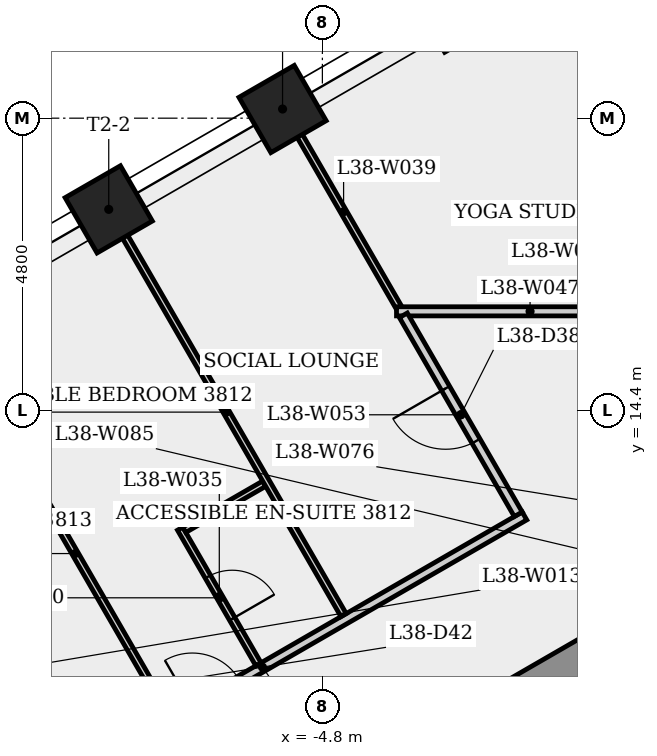
"""IFC4 building model, lengths in metres.
Left out: names, types, materials, properties, quantities, classifications, styles, units other than length and angle.
Written with IfcOpenShell. Run it as: python <this file> out.ifc"""

import sys

from ifc_helpers import new_model, si_unit, direction, frame, frame_2d, origin, origin_2d, place, context, subcontext, project, spatial, rectangle, extrude, element, fill, save


model = new_model("IFC4")
c1 = context("Model", 3, precision=1e-05, world=origin(), true_north=direction((0.0, 1.0)))
c2 = subcontext(c1, "Body", "Model", "MODEL_VIEW")
j1 = project(units=[si_unit("LENGTHUNIT", "METRE"), si_unit("PLANEANGLEUNIT", "RADIAN")], contexts=[c1])
p1 = place(None, origin())
s1 = spatial("IfcSite", under=j1, at=p1, CompositionType="ELEMENT")
p2 = place(p1, origin())
s2 = spatial("IfcBuilding", under=s1, at=p2, CompositionType="ELEMENT")
p3 = place(p2, frame((0.0, 0.0, 143.9)))
s3 = spatial("IfcBuildingStorey", under=s2, at=p3, CompositionType="ELEMENT", Elevation=143.9)
p4 = place(p3, frame((0.175, 10.667, 0.0), z_axis=(0.0, 0.0, 1.0), x_axis=(-0.866023993627, -0.500002442456, 0.0)))
e1 = element("IfcWall", 1, at=p4, inside=s3, PredefinedType="SHEAR", context=c2, shape_type="SweptSolid", body=[
    extrude(rectangle(XDim=10.97, YDim=0.7, at=frame_2d((5.485, 0.0))), origin(), (0.0, 0.0, 1.0), 4.0),
])
p5 = place(p4, frame((7.021, 0.0, 0.0)))
e2 = element("IfcOpeningElement", 2, at=p5, cuts=e1, PredefinedType="OPENING", context=c2, shape_type="SweptSolid", body=[
    extrude(rectangle(XDim=0.9, YDim=2.1, at=frame_2d((0.45, 1.05))), frame((0.0, 0.36, 0.0), z_axis=(0.0, -1.0, 0.0), x_axis=(1.0, 0.0, 0.0)), (0.0, 0.0, 1.0), 0.72),
])
for number, where, z_axis, x_axis in (
    (3, (-2.596, 21.001, 0.0), (0.0, 0.0, 1.0), (-0.5, 0.866, 0.0)),
    (4, (-5.455, 19.351, 0.0), (0.0, 0.0, 1.0), (-0.5, 0.866, 0.0)),
    (5, (-8.313, 17.7, 0.0), (0.0, 0.0, 1.0), (-0.5, 0.866, 0.0)),
):
    element("IfcColumn", number, at=place(p3, frame(where, z_axis=z_axis, x_axis=x_axis)), inside=s3, PredefinedType="COLUMN", context=c2, shape_type="SweptSolid", body=[
        extrude(rectangle(XDim=1.05, YDim=1.05, at=origin_2d()), origin(), (0.0, 0.0, 1.0), 4.0),
    ])
p6 = place(p3, frame((-10.094, 7.682, 0.0), z_axis=(0.0, 0.0, 1.0), x_axis=(0.866024204941, 0.500002076452, 0.0)))
e6 = element("IfcWall", 6, at=p6, inside=s3, PredefinedType="PARTITIONING", context=c2, shape_type="SweptSolid", body=[
    extrude(rectangle(XDim=9.951, YDim=0.15, at=frame_2d((4.976, 0.0))), origin(), (0.0, 0.0, 1.0), 3.6),
])
p7 = place(p6, frame((3.642, 0.0, 0.0)))
e7 = element("IfcOpeningElement", 7, at=p7, cuts=e6, PredefinedType="OPENING", context=c2, shape_type="SweptSolid", body=[
    extrude(rectangle(XDim=0.9, YDim=2.1, at=frame_2d((0.45, 1.05))), frame((0.0, 0.085, 0.0), z_axis=(0.0, -1.0, 0.0), x_axis=(1.0, 0.0, 0.0)), (0.0, 0.0, 1.0), 0.17),
])
p8 = place(p3, frame((-8.796, 8.518, 0.0), z_axis=(0.0, 0.0, 1.0), x_axis=(-0.500032699561, 0.866006523861, 0.0)))
e8 = element("IfcWall", 8, at=p8, inside=s3, PredefinedType="PARTITIONING", context=c2, shape_type="SweptSolid", body=[
    extrude(rectangle(XDim=2.475, YDim=0.1, at=frame_2d((1.237, 0.0))), origin(), (0.0, 0.0, 1.0), 3.6),
])
p9 = place(p8, frame((0.837, 0.0, 0.0)))
e9 = element("IfcOpeningElement", 9, at=p9, cuts=e8, PredefinedType="OPENING", context=c2, shape_type="SweptSolid", body=[
    extrude(rectangle(XDim=0.8, YDim=2.1, at=frame_2d((0.4, 1.05))), frame((0.0, 0.06, 0.0), z_axis=(0.0, -1.0, 0.0), x_axis=(1.0, 0.0, 0.0)), (0.0, 0.0, 1.0), 0.12),
])
p10 = place(p3, frame((-7.324, 9.368, 0.0), z_axis=(0.0, 0.0, 1.0), x_axis=(-0.500021201058, 0.866013163002, 0.0)))
e10 = element("IfcWall", 10, at=p10, inside=s3, PredefinedType="PARTITIONING", context=c2, shape_type="SweptSolid", body=[
    extrude(rectangle(XDim=7.711, YDim=0.1, at=frame_2d((3.855, 0.0))), origin(), (0.0, 0.0, 1.0), 3.6),
])
p11 = place(p3, frame((-7.139, 12.448, 0.0), z_axis=(0.0, 0.0, 1.0), x_axis=(0.500034319456, -0.866005588531, 0.0)))
e11 = element("IfcWall", 11, at=p11, inside=s3, PredefinedType="PARTITIONING", context=c2, shape_type="SweptSolid", body=[
    extrude(rectangle(XDim=2.575, YDim=0.1, at=frame_2d((1.288, 0.0))), origin(), (0.0, 0.0, 1.0), 3.6),
])
p12 = place(p11, frame((0.913, 0.0, 0.0)))
e12 = element("IfcOpeningElement", 12, at=p12, cuts=e11, PredefinedType="OPENING", context=c2, shape_type="SweptSolid", body=[
    extrude(rectangle(XDim=0.8, YDim=2.1, at=frame_2d((0.4, 1.05))), frame((0.0, 0.06, 0.0), z_axis=(0.0, -1.0, 0.0), x_axis=(1.0, 0.0, 0.0)), (0.0, 0.0, 1.0), 0.12),
])
p13 = place(p3, frame((-5.757, 13.188, 0.0), z_axis=(0.0, 0.0, 1.0), x_axis=(-0.866006015803, -0.500033579465, 0.0)))
e13 = element("IfcWall", 13, at=p13, inside=s3, PredefinedType="PARTITIONING", context=c2, shape_type="SweptSolid", body=[
    extrude(rectangle(XDim=1.517, YDim=0.1, at=frame_2d((0.759, 0.0))), origin(), (0.0, 0.0, 1.0), 3.6),
])
p14 = place(p3, frame((-5.359, 19.233, 0.0), z_axis=(0.0, 0.0, 1.0), x_axis=(0.499978511878, -0.866037809602, 0.0)))
e14 = element("IfcWall", 14, at=p14, inside=s3, PredefinedType="PARTITIONING", context=c2, shape_type="SweptSolid", body=[
    extrude(rectangle(XDim=3.632, YDim=0.1, at=frame_2d((1.816, 0.0))), origin(), (0.0, 0.0, 1.0), 3.6),
])
p15 = place(p3, frame((-4.451, 11.027, 0.0), z_axis=(0.0, 0.0, 1.0), x_axis=(-0.499983743644, 0.866034789193, 0.0)))
e15 = element("IfcWall", 15, at=p15, inside=s3, PredefinedType="PARTITIONING", context=c2, shape_type="SweptSolid", body=[
    extrude(rectangle(XDim=7.711, YDim=0.1, at=frame_2d((3.855, 0.0))), origin(), (0.0, 0.0, 1.0), 3.6),
])
p16 = place(p3, frame((-4.951, 26.117, 0.0), z_axis=(0.0, 0.0, 1.0), x_axis=(0.866023342268, -0.500003570635, 0.0)))
e16 = element("IfcWall", 16, at=p16, inside=s3, PredefinedType="PARTITIONING", context=c2, shape_type="SweptSolid", body=[
    extrude(rectangle(XDim=25.385, YDim=0.1, at=frame_2d((12.692, 0.0))), origin(), (0.0, 0.0, 1.0), 3.6),
])
p17 = place(p3, frame((-3.581, 16.023, 0.0), z_axis=(0.0, 0.0, 1.0), x_axis=(1.0, 0.0, 0.0)))
e17 = element("IfcWall", 17, at=p17, inside=s3, PredefinedType="PARTITIONING", context=c2, shape_type="SweptSolid", body=[
    extrude(rectangle(XDim=4.393, YDim=0.15, at=frame_2d((2.196, 0.0))), origin(), (0.0, 0.0, 1.0), 3.6),
])
p18 = place(p3, frame((-3.283, 29.005, 0.0), z_axis=(0.0, 0.0, 1.0), x_axis=(0.866023342268, -0.500003570635, 0.0)))
e18 = element("IfcWall", 18, at=p18, inside=s3, PredefinedType="PARTITIONING", context=c2, shape_type="SweptSolid", body=[
    extrude(rectangle(XDim=25.385, YDim=0.1, at=frame_2d((12.692, 0.0))), origin(), (0.0, 0.0, 1.0), 3.6),
])
p19 = place(p3, frame((-1.579, 12.685, 0.0), z_axis=(0.0, 0.0, 1.0), x_axis=(-0.500002049001, 0.86602422079, 0.0)))
e19 = element("IfcWall", 19, at=p19, inside=s3, PredefinedType="PARTITIONING", context=c2, shape_type="SweptSolid", body=[
    extrude(rectangle(XDim=3.779, YDim=0.15, at=frame_2d((1.89, 0.0))), origin(), (0.0, 0.0, 1.0), 3.6),
])
p20 = place(p19, frame((1.39, 0.0, 0.0)))
e20 = element("IfcOpeningElement", 20, at=p20, cuts=e19, PredefinedType="OPENING", context=c2, shape_type="SweptSolid", body=[
    extrude(rectangle(XDim=1.0, YDim=2.1, at=frame_2d((0.5, 1.05))), frame((0.0, 0.085, 0.0), z_axis=(0.0, -1.0, 0.0), x_axis=(1.0, 0.0, 0.0)), (0.0, 0.0, 1.0), 0.17),
])
p21 = place(p3, frame((-1.615, 31.894, 0.0), z_axis=(0.0, 0.0, 1.0), x_axis=(0.866023342268, -0.500003570635, 0.0)))
e21 = element("IfcWall", 21, at=p21, inside=s3, PredefinedType="PARTITIONING", context=c2, shape_type="SweptSolid", body=[
    extrude(rectangle(XDim=25.385, YDim=0.1, at=frame_2d((12.692, 0.0))), origin(), (0.0, 0.0, 1.0), 3.6),
])
p22 = place(p20, origin())
e22 = element("IfcDoor", 22, at=p22, inside=s3, OperationType="SINGLE_SWING_RIGHT", PredefinedType="DOOR", context=c2, shape_type="SweptSolid", body=[
    extrude(rectangle(XDim=1.0, YDim=2.1, at=frame_2d((0.5, 1.05))), frame((0.0, 0.025, 0.0), z_axis=(0.0, -1.0, 0.0), x_axis=(1.0, 0.0, 0.0)), (0.0, 0.0, 1.0), 0.05),
])
fill(e20, e22)
p23 = place(p12, origin())
e23 = element("IfcDoor", 23, at=p23, inside=s3, OperationType="SINGLE_SWING_RIGHT", PredefinedType="DOOR", context=c2, shape_type="SweptSolid", body=[
    extrude(rectangle(XDim=0.8, YDim=2.1, at=frame_2d((0.4, 1.05))), frame((0.0, 0.025, 0.0), z_axis=(0.0, -1.0, 0.0), x_axis=(1.0, 0.0, 0.0)), (0.0, 0.0, 1.0), 0.05),
])
fill(e12, e23)
save(model, sys.argv[1])
